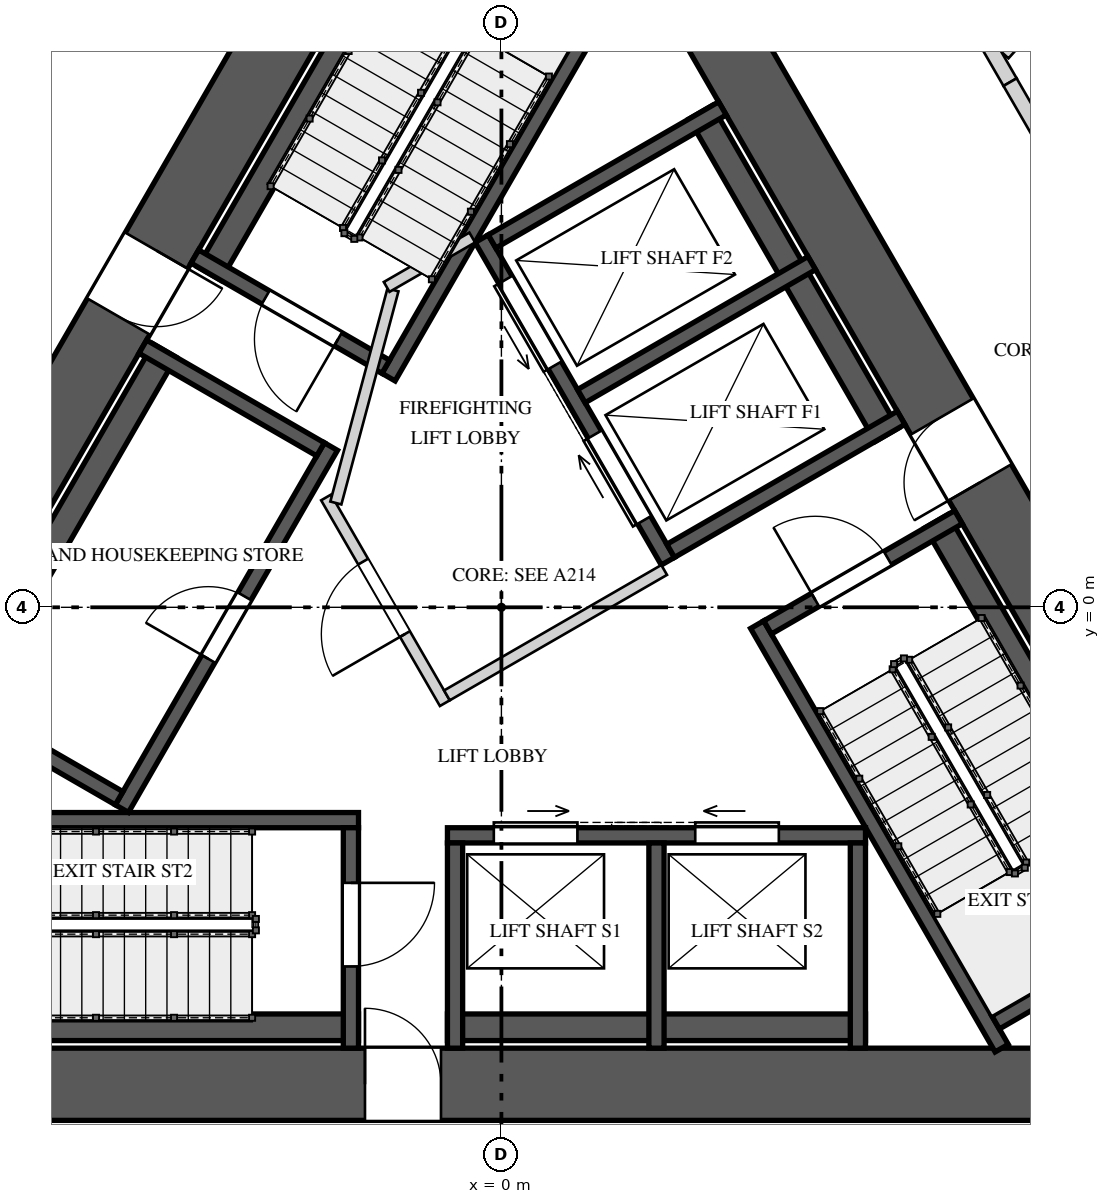
"""IFC4 building model, lengths in metres.
Left out: names, types, materials, properties, quantities, classifications, styles, units other than length and angle.
Written with IfcOpenShell. Run it as: python <this file> out.ifc"""

import sys

from ifc_helpers import new_model, si_unit, direction, frame, frame_2d, origin, place, context, subcontext, project, spatial, rectangle, extrude, element, fill, save


model = new_model("IFC4")
c1 = context("Model", 3, precision=1e-05, world=origin(), true_north=direction((0.0, 1.0)))
c2 = subcontext(c1, "Body", "Model", "MODEL_VIEW")
j1 = project(units=[si_unit("LENGTHUNIT", "METRE"), si_unit("PLANEANGLEUNIT", "RADIAN")], contexts=[c1])
p1 = place(None, origin())
s1 = spatial("IfcSite", under=j1, at=p1, CompositionType="ELEMENT")
p2 = place(p1, origin())
s2 = spatial("IfcBuilding", under=s1, at=p2, CompositionType="ELEMENT")
p3 = place(p2, frame((0.0, 0.0, 88.4)))
s3 = spatial("IfcBuildingStorey", under=s2, at=p3, CompositionType="ELEMENT", Elevation=88.4)
p4 = place(p3, frame((-1.169, 10.525, 0.0), z_axis=(0.0, 0.0, 1.0), x_axis=(-0.499999102847, -0.866025921755, 0.0)))
e1 = element("IfcWall", 1, at=p4, inside=s3, PredefinedType="SHEAR", context=c2, shape_type="SweptSolid", body=[
    extrude(rectangle(XDim=17.061, YDim=0.95, at=frame_2d((8.53, 0.0))), origin(), (0.0, 0.0, 1.0), 4.0),
])
p5 = place(p4, frame((6.735, 0.0, 0.0)))
e2 = element("IfcOpeningElement", 2, at=p5, cuts=e1, PredefinedType="OPENING", context=c2, shape_type="SweptSolid", body=[
    extrude(rectangle(XDim=1.0, YDim=2.4, at=frame_2d((0.5, 1.2))), frame((0.0, 0.485, 0.0), z_axis=(0.0, -1.0, 0.0), x_axis=(1.0, 0.0, 0.0)), (0.0, 0.0, 1.0), 0.97),
])
p6 = place(p4, frame((14.613, 0.0, 0.0)))
e3 = element("IfcOpeningElement", 3, at=p6, cuts=e1, PredefinedType="OPENING", context=c2, shape_type="SweptSolid", body=[
    extrude(rectangle(XDim=0.8, YDim=2.1, at=frame_2d((0.4, 1.05))), frame((0.0, 0.485, 0.0), z_axis=(0.0, -1.0, 0.0), x_axis=(1.0, 0.0, 0.0)), (0.0, 0.0, 1.0), 0.97),
])
p7 = place(p3, frame((-8.531, -6.275, 0.0), z_axis=(0.0, 0.0, 1.0), x_axis=(1.0, 0.0, 0.0)))
e4 = element("IfcWall", 4, at=p7, inside=s3, PredefinedType="SHEAR", context=c2, shape_type="SweptSolid", body=[
    extrude(rectangle(XDim=17.061, YDim=0.95, at=frame_2d((8.531, 0.0))), origin(), (0.0, 0.0, 1.0), 4.0),
])
p8 = place(p7, frame((6.735, 0.0, 0.0)))
e5 = element("IfcOpeningElement", 5, at=p8, cuts=e4, PredefinedType="OPENING", context=c2, shape_type="SweptSolid", body=[
    extrude(rectangle(XDim=1.0, YDim=2.4, at=frame_2d((0.5, 1.2))), frame((0.0, 0.485, 0.0), z_axis=(0.0, -1.0, 0.0), x_axis=(1.0, 0.0, 0.0)), (0.0, 0.0, 1.0), 0.97),
])
p9 = place(p3, frame((9.699, -4.25, 0.0), z_axis=(0.0, 0.0, 1.0), x_axis=(-0.499999102847, 0.866025921755, 0.0)))
e6 = element("IfcWall", 6, at=p9, inside=s3, PredefinedType="SHEAR", context=c2, shape_type="SweptSolid", body=[
    extrude(rectangle(XDim=17.061, YDim=0.95, at=frame_2d((8.53, 0.0))), origin(), (0.0, 0.0, 1.0), 4.0),
])
p10 = place(p9, frame((6.805, 0.0, 0.0)))
e7 = element("IfcOpeningElement", 7, at=p10, cuts=e6, PredefinedType="OPENING", context=c2, shape_type="SweptSolid", body=[
    extrude(rectangle(XDim=1.0, YDim=2.4, at=frame_2d((0.5, 1.2))), frame((0.0, 0.485, 0.0), z_axis=(0.0, -1.0, 0.0), x_axis=(1.0, 0.0, 0.0)), (0.0, 0.0, 1.0), 0.97),
])
p11 = place(p3, frame((-0.745, 9.76, 0.0), z_axis=(0.0, 0.0, 1.0), x_axis=(-0.49998037582, -0.866036733513, 0.0)))
e8 = element("IfcWall", 8, at=p11, inside=s3, PredefinedType="SOLIDWALL", context=c2, shape_type="SweptSolid", body=[
    extrude(rectangle(XDim=6.2, YDim=0.35, at=frame_2d((3.1, 0.0))), origin(), (0.0, 0.0, 1.0), 3.65),
])
p12 = place(p3, frame((1.732, 8.6, 0.0), z_axis=(0.0, 0.0, 1.0), x_axis=(-0.499975376872, -0.866039619487, 0.0)))
e9 = element("IfcWall", 9, at=p12, inside=s3, PredefinedType="SOLIDWALL", context=c2, shape_type="SweptSolid", body=[
    extrude(rectangle(XDim=6.434, YDim=0.2, at=frame_2d((3.217, 0.0))), origin(), (0.0, 0.0, 1.0), 3.65),
])
p13 = place(p3, frame((-1.521, 3.165, 0.0), z_axis=(0.0, 0.0, 1.0), x_axis=(-0.866032775405, 0.499987231761, 0.0)))
e10 = element("IfcWall", 10, at=p13, inside=s3, PredefinedType="SOLIDWALL", context=c2, shape_type="SweptSolid", body=[
    extrude(rectangle(XDim=2.9, YDim=0.2, at=frame_2d((1.45, 0.0))), origin(), (0.0, 0.0, 1.0), 3.65),
])
p14 = place(p13, frame((0.725, 0.0, 0.0)))
e11 = element("IfcOpeningElement", 11, at=p14, cuts=e10, PredefinedType="OPENING", context=c2, shape_type="SweptSolid", body=[
    extrude(rectangle(XDim=1.1, YDim=2.4, at=frame_2d((0.55, 1.2))), frame((0.0, 0.11, 0.0), z_axis=(0.0, -1.0, 0.0), x_axis=(1.0, 0.0, 0.0)), (0.0, 0.0, 1.0), 0.22),
])
p15 = place(p3, frame((-8.08, -5.525, 0.0), z_axis=(0.0, 0.0, 1.0), x_axis=(1.0, 0.0, 0.0)))
e12 = element("IfcWall", 12, at=p15, inside=s3, PredefinedType="SOLIDWALL", context=c2, shape_type="SweptSolid", body=[
    extrude(rectangle(XDim=6.2, YDim=0.35, at=frame_2d((3.1, 0.0))), origin(), (0.0, 0.0, 1.0), 3.65),
])
p16 = place(p3, frame((-8.314, -2.8, 0.0), z_axis=(0.0, 0.0, 1.0), x_axis=(1.0, 0.0, 0.0)))
e13 = element("IfcWall", 13, at=p16, inside=s3, PredefinedType="SOLIDWALL", context=c2, shape_type="SweptSolid", body=[
    extrude(rectangle(XDim=6.434, YDim=0.2, at=frame_2d((3.217, 0.0))), origin(), (0.0, 0.0, 1.0), 3.65),
])
p17 = place(p3, frame((-1.98, -2.9, 0.0), z_axis=(0.0, 0.0, 1.0), x_axis=(0.0, -1.0, 0.0)))
e14 = element("IfcWall", 14, at=p17, inside=s3, PredefinedType="SOLIDWALL", context=c2, shape_type="SweptSolid", body=[
    extrude(rectangle(XDim=2.9, YDim=0.2, at=frame_2d((1.45, 0.0))), origin(), (0.0, 0.0, 1.0), 3.65),
])
p18 = place(p17, frame((0.725, 0.0, 0.0)))
e15 = element("IfcOpeningElement", 15, at=p18, cuts=e14, PredefinedType="OPENING", context=c2, shape_type="SweptSolid", body=[
    extrude(rectangle(XDim=1.1, YDim=2.4, at=frame_2d((0.55, 1.2))), frame((0.0, 0.11, 0.0), z_axis=(0.0, -1.0, 0.0), x_axis=(1.0, 0.0, 0.0)), (0.0, 0.0, 1.0), 0.22),
])
p19 = place(p3, frame((8.825, -4.235, 0.0), z_axis=(0.0, 0.0, 1.0), x_axis=(-0.499997426962, 0.866026889324, 0.0)))
e16 = element("IfcWall", 16, at=p19, inside=s3, PredefinedType="SOLIDWALL", context=c2, shape_type="SweptSolid", body=[
    extrude(rectangle(XDim=6.2, YDim=0.35, at=frame_2d((3.1, 0.0))), origin(), (0.0, 0.0, 1.0), 3.65),
])
p20 = place(p3, frame((6.582, -5.8, 0.0), z_axis=(0.0, 0.0, 1.0), x_axis=(-0.499975376872, 0.866039619487, 0.0)))
e17 = element("IfcWall", 17, at=p20, inside=s3, PredefinedType="SOLIDWALL", context=c2, shape_type="SweptSolid", body=[
    extrude(rectangle(XDim=6.434, YDim=0.2, at=frame_2d((3.217, 0.0))), origin(), (0.0, 0.0, 1.0), 3.65),
])
p21 = place(p3, frame((6.501, -5.461, 0.0), z_axis=(0.0, 0.0, 1.0), x_axis=(0.866032775405, 0.499987231761, 0.0)))
e18 = element("IfcWall", 18, at=p21, inside=s3, PredefinedType="SOLIDWALL", context=c2, shape_type="SweptSolid", body=[
    extrude(rectangle(XDim=2.9, YDim=0.2, at=frame_2d((1.45, 0.0))), origin(), (0.0, 0.0, 1.0), 3.65),
])
p22 = place(p3, frame((3.501, -0.265, 0.0), z_axis=(0.0, 0.0, 1.0), x_axis=(0.866032775405, 0.499987231761, 0.0)))
e19 = element("IfcWall", 19, at=p22, inside=s3, PredefinedType="SOLIDWALL", context=c2, shape_type="SweptSolid", body=[
    extrude(rectangle(XDim=2.9, YDim=0.2, at=frame_2d((1.45, 0.0))), origin(), (0.0, 0.0, 1.0), 3.65),
])
p23 = place(p22, frame((0.725, 0.0, 0.0)))
e20 = element("IfcOpeningElement", 20, at=p23, cuts=e19, PredefinedType="OPENING", context=c2, shape_type="SweptSolid", body=[
    extrude(rectangle(XDim=1.1, YDim=2.4, at=frame_2d((0.55, 1.2))), frame((0.0, 0.11, 0.0), z_axis=(0.0, -1.0, 0.0), x_axis=(1.0, 0.0, 0.0)), (0.0, 0.0, 1.0), 0.22),
])
p24 = place(p3, frame((-4.993, -2.648, 0.0), z_axis=(0.0, 0.0, 1.0), x_axis=(0.499996545922, 0.866027397988, 0.0)))
e21 = element("IfcWall", 21, at=p24, inside=s3, PredefinedType="SOLIDWALL", context=c2, shape_type="SweptSolid", body=[
    extrude(rectangle(XDim=5.5, YDim=0.2, at=frame_2d((2.75, 0.0))), origin(), (0.0, 0.0, 1.0), 3.65),
])
p25 = place(p24, frame((2.275, 0.0, 0.0)))
e22 = element("IfcOpeningElement", 22, at=p25, cuts=e21, PredefinedType="OPENING", context=c2, shape_type="SweptSolid", body=[
    extrude(rectangle(XDim=0.95, YDim=2.4, at=frame_2d((0.475, 1.2))), frame((0.0, 0.11, 0.0), z_axis=(0.0, -1.0, 0.0), x_axis=(1.0, 0.0, 0.0)), (0.0, 0.0, 1.0), 0.22),
])
p26 = place(p3, frame((-4.43, 3.377, 0.0), z_axis=(0.0, 0.0, 1.0), x_axis=(-0.499996545922, -0.866027397988, 0.0)))
e23 = element("IfcWall", 23, at=p26, inside=s3, PredefinedType="SOLIDWALL", context=c2, shape_type="SweptSolid", body=[
    extrude(rectangle(XDim=5.5, YDim=0.35, at=frame_2d((2.75, 0.0))), origin(), (0.0, 0.0, 1.0), 3.65),
])
for number, where, z_axis, x_axis in (
    (24, (-2.38, 2.078, 0.0), (0.0, 0.0, 1.0), (-0.866, 0.5, 0.0)),
    (25, (-5.03, -2.512, 0.0), (0.0, 0.0, 1.0), (-0.866, 0.5, 0.0)),
):
    element("IfcWall", number, at=place(p3, frame(where, z_axis=z_axis, x_axis=x_axis)), inside=s3, PredefinedType="SOLIDWALL", context=c2, shape_type="SweptSolid", body=[
        extrude(rectangle(XDim=2.7, YDim=0.2, at=frame_2d((1.35, 0.0))), origin(), (0.0, 0.0, 1.0), 3.65),
    ])
p27 = place(p3, frame((-0.71, -3.0, 0.0), z_axis=(0.0, 0.0, 1.0), x_axis=(1.0, 0.0, 0.0)))
e26 = element("IfcWall", 26, at=p27, inside=s3, PredefinedType="SOLIDWALL", context=c2, shape_type="SweptSolid", body=[
    extrude(rectangle(XDim=5.5, YDim=0.2, at=frame_2d((2.75, 0.0))), origin(), (0.0, 0.0, 1.0), 3.65),
])
p28 = place(p27, frame((0.61, 0.0, 0.0)))
e27 = element("IfcOpeningElement", 27, at=p28, cuts=e26, PredefinedType="OPENING", context=c2, shape_type="SweptSolid", body=[
    extrude(rectangle(XDim=1.1, YDim=2.1, at=frame_2d((0.55, 1.05))), frame((0.0, 0.11, 0.0), z_axis=(0.0, -1.0, 0.0), x_axis=(1.0, 0.0, 0.0)), (0.0, 0.0, 1.0), 0.22),
])
p29 = place(p27, frame((3.26, 0.0, 0.0)))
e28 = element("IfcOpeningElement", 28, at=p29, cuts=e26, PredefinedType="OPENING", context=c2, shape_type="SweptSolid", body=[
    extrude(rectangle(XDim=1.1, YDim=2.1, at=frame_2d((0.55, 1.05))), frame((0.0, 0.11, 0.0), z_axis=(0.0, -1.0, 0.0), x_axis=(1.0, 0.0, 0.0)), (0.0, 0.0, 1.0), 0.22),
])
p30 = place(p3, frame((-0.71, -5.525, 0.0), z_axis=(0.0, 0.0, 1.0), x_axis=(1.0, 0.0, 0.0)))
e29 = element("IfcWall", 29, at=p30, inside=s3, PredefinedType="SOLIDWALL", context=c2, shape_type="SweptSolid", body=[
    extrude(rectangle(XDim=5.5, YDim=0.35, at=frame_2d((2.75, 0.0))), origin(), (0.0, 0.0, 1.0), 3.65),
])
for number, where, z_axis, x_axis in (
    (30, (-0.61, -3.1, 0.0), (0.0, 0.0, 1.0), (0.0, -1.0, 0.0)),
    (31, (2.04, -3.1, 0.0), (0.0, 0.0, 1.0), (0.0, -1.0, 0.0)),
    (32, (4.69, -3.1, 0.0), (0.0, 0.0, 1.0), (0.0, -1.0, 0.0)),
):
    element("IfcWall", number, at=place(p3, frame(where, z_axis=z_axis, x_axis=x_axis)), inside=s3, PredefinedType="SOLIDWALL", context=c2, shape_type="SweptSolid", body=[
        extrude(rectangle(XDim=2.7, YDim=0.2, at=frame_2d((1.35, 0.0))), origin(), (0.0, 0.0, 1.0), 3.65),
    ])
p31 = place(p3, frame((2.19, 0.606, 0.0), z_axis=(0.0, 0.0, 1.0), x_axis=(-0.500002801628, 0.866023786258, 0.0)))
e33 = element("IfcWall", 33, at=p31, inside=s3, PredefinedType="SOLIDWALL", context=c2, shape_type="SweptSolid", body=[
    extrude(rectangle(XDim=4.9, YDim=0.2, at=frame_2d((2.45, 0.0))), origin(), (0.0, 0.0, 1.0), 3.65),
])
p32 = place(p31, frame((0.625, 0.0, 0.0)))
e34 = element("IfcOpeningElement", 34, at=p32, cuts=e33, PredefinedType="OPENING", context=c2, shape_type="SweptSolid", body=[
    extrude(rectangle(XDim=1.3, YDim=2.1, at=frame_2d((0.65, 1.05))), frame((0.0, 0.11, 0.0), z_axis=(0.0, -1.0, 0.0), x_axis=(1.0, 0.0, 0.0)), (0.0, 0.0, 1.0), 0.22),
])
p33 = place(p31, frame((2.975, 0.0, 0.0)))
e35 = element("IfcOpeningElement", 35, at=p33, cuts=e33, PredefinedType="OPENING", context=c2, shape_type="SweptSolid", body=[
    extrude(rectangle(XDim=1.3, YDim=2.1, at=frame_2d((0.65, 1.05))), frame((0.0, 0.11, 0.0), z_axis=(0.0, -1.0, 0.0), x_axis=(1.0, 0.0, 0.0)), (0.0, 0.0, 1.0), 0.22),
])
p34 = place(p3, frame((5.07, 2.269, 0.0), z_axis=(0.0, 0.0, 1.0), x_axis=(-0.49998122708, 0.866036242063, 0.0)))
e36 = element("IfcWall", 36, at=p34, inside=s3, PredefinedType="SOLIDWALL", context=c2, shape_type="SweptSolid", body=[
    extrude(rectangle(XDim=4.9, YDim=0.35, at=frame_2d((2.45, 0.0))), origin(), (0.0, 0.0, 1.0), 3.65),
])
for number, where, z_axis, x_axis in (
    (37, (2.227, 0.743, 0.0), (0.0, 0.0, 1.0), (0.866, 0.5, 0.0)),
    (38, (1.052, 2.778, 0.0), (0.0, 0.0, 1.0), (0.866, 0.5, 0.0)),
):
    element("IfcWall", number, at=place(p3, frame(where, z_axis=z_axis, x_axis=x_axis)), inside=s3, PredefinedType="SOLIDWALL", context=c2, shape_type="SweptSolid", body=[
        extrude(rectangle(XDim=3.5, YDim=0.2, at=frame_2d((1.75, 0.0))), origin(), (0.0, 0.0, 1.0), 3.65),
    ])
p35 = place(p3, frame((-0.123, 4.813, 0.0), z_axis=(0.0, 0.0, 1.0), x_axis=(0.866019471182, 0.500010275428, 0.0)))
e39 = element("IfcWall", 39, at=p35, inside=s3, PredefinedType="SOLIDWALL", context=c2, shape_type="SweptSolid", body=[
    extrude(rectangle(XDim=3.5, YDim=0.2, at=frame_2d((1.75, 0.0))), origin(), (0.0, 0.0, 1.0), 3.65),
])
p36 = place(p3, frame((-0.744, -1.261, 0.0), z_axis=(0.0, 0.0, 1.0), x_axis=(-0.500004234368, 0.866022959057, 0.0)))
e40 = element("IfcWall", 40, at=p36, inside=s3, PredefinedType="PARTITIONING", context=c2, shape_type="SweptSolid", body=[
    extrude(rectangle(XDim=3.125, YDim=0.15, at=frame_2d((1.562, 0.0))), origin(), (0.0, 0.0, 1.0), 3.65),
])
p37 = place(p36, frame((1.05, 0.0, 0.0)))
e41 = element("IfcOpeningElement", 41, at=p37, cuts=e40, PredefinedType="OPENING", context=c2, shape_type="SweptSolid", body=[
    extrude(rectangle(XDim=1.1, YDim=2.4, at=frame_2d((0.55, 1.2))), frame((0.0, 0.085, 0.0), z_axis=(0.0, -1.0, 0.0), x_axis=(1.0, 0.0, 0.0)), (0.0, 0.0, 1.0), 0.17),
])
p38 = place(p3, frame((-0.717, -1.159, 0.0), z_axis=(0.0, 0.0, 1.0), x_axis=(0.866008176907, 0.50002983664, 0.0)))
e42 = element("IfcWall", 42, at=p38, inside=s3, PredefinedType="PARTITIONING", context=c2, shape_type="SweptSolid", body=[
    extrude(rectangle(XDim=3.3, YDim=0.15, at=frame_2d((1.65, 0.0))), origin(), (0.0, 0.0, 1.0), 3.65),
])
p39 = place(p3, frame((-2.178, 1.372, 0.0), z_axis=(0.0, 0.0, 1.0), x_axis=(0.258808958833, 0.96592852884, 0.0)))
e43 = element("IfcWall", 43, at=p39, inside=s3, PredefinedType="PARTITIONING", context=c2, shape_type="SweptSolid", body=[
    extrude(rectangle(XDim=2.903, YDim=0.15, at=frame_2d((1.451, 0.0))), origin(), (0.0, 0.0, 1.0), 3.65),
])
p40 = place(p3, frame((-1.51, 4.215, 0.0), z_axis=(0.0, 0.0, 1.0), x_axis=(0.866085525409, 0.49989585183, 0.0)))
e44 = element("IfcWall", 44, at=p40, inside=s3, PredefinedType="PARTITIONING", context=c2, shape_type="SweptSolid", body=[
    extrude(rectangle(XDim=1.3, YDim=0.15, at=frame_2d((0.65, 0.0))), origin(), (0.0, 0.0, 1.0), 3.65),
])
p41 = place(p3, frame((11.442, 12.708, 0.0), z_axis=(0.0, 0.0, 1.0), x_axis=(-0.66912430182, -0.743150502061, 0.0)))
e45 = element("IfcWall", 45, at=p41, inside=s3, PredefinedType="SOLIDWALL", context=c2, shape_type="SweptSolid", body=[
    extrude(rectangle(XDim=7.269, YDim=0.25, at=frame_2d((3.634, 0.0))), origin(), (0.0, 0.0, 1.0), 2.95),
])
p42 = place(p3, frame((6.324, 7.547, 0.0), z_axis=(0.0, 0.0, 1.0), x_axis=(0.499885169746, -0.866091690913, 0.0)))
e46 = element("IfcWall", 46, at=p42, inside=s3, PredefinedType="SOLIDWALL", context=c2, shape_type="SweptSolid", body=[
    extrude(rectangle(XDim=0.736, YDim=0.2, at=frame_2d((0.368, 0.0))), origin(), (0.0, 0.0, 1.0), 2.95),
])
p43 = place(p3, frame((6.692, 6.909, 0.0), z_axis=(0.0, 0.0, 1.0), x_axis=(0.500029679218, -0.866008267802, 0.0)))
e47 = element("IfcWall", 47, at=p43, inside=s3, PredefinedType="SOLIDWALL", context=c2, shape_type="SweptSolid", body=[
    extrude(rectangle(XDim=3.577, YDim=0.2, at=frame_2d((1.789, 0.0))), origin(), (0.0, 0.0, 1.0), 3.65),
])
p44 = place(p3, frame((-7.137, 6.139, 0.0), z_axis=(0.0, 0.0, 1.0), x_axis=(0.500035462246, 0.866004928679, 0.0)))
e48 = element("IfcWall", 48, at=p44, inside=s3, PredefinedType="SOLIDWALL", context=c2, shape_type="SweptSolid", body=[
    extrude(rectangle(XDim=2.385, YDim=0.2, at=frame_2d((1.193, 0.0))), origin(), (0.0, 0.0, 1.0), 3.65),
])
p45 = place(p14, origin())
e49 = element("IfcDoor", 49, at=p45, inside=s3, OperationType="SINGLE_SWING_RIGHT", PredefinedType="DOOR", context=c2, shape_type="SweptSolid", body=[
    extrude(rectangle(XDim=1.1, YDim=2.4, at=frame_2d((0.55, 1.2))), frame((0.0, 0.025, 0.0), z_axis=(0.0, -1.0, 0.0), x_axis=(1.0, 0.0, 0.0)), (0.0, 0.0, 1.0), 0.05),
])
fill(e11, e49)
p46 = place(p18, origin())
e50 = element("IfcDoor", 50, at=p46, inside=s3, OperationType="SINGLE_SWING_LEFT", PredefinedType="DOOR", context=c2, shape_type="SweptSolid", body=[
    extrude(rectangle(XDim=1.1, YDim=2.4, at=frame_2d((0.55, 1.2))), frame((0.0, 0.025, 0.0), z_axis=(0.0, -1.0, 0.0), x_axis=(1.0, 0.0, 0.0)), (0.0, 0.0, 1.0), 0.05),
])
fill(e15, e50)
p47 = place(p23, origin())
e51 = element("IfcDoor", 51, at=p47, inside=s3, OperationType="SINGLE_SWING_RIGHT", PredefinedType="DOOR", context=c2, shape_type="SweptSolid", body=[
    extrude(rectangle(XDim=1.1, YDim=2.4, at=frame_2d((0.55, 1.2))), frame((0.0, 0.025, 0.0), z_axis=(0.0, -1.0, 0.0), x_axis=(1.0, 0.0, 0.0)), (0.0, 0.0, 1.0), 0.05),
])
fill(e20, e51)
p48 = place(p25, origin())
e52 = element("IfcDoor", 52, at=p48, inside=s3, OperationType="SINGLE_SWING_LEFT", PredefinedType="DOOR", context=c2, shape_type="SweptSolid", body=[
    extrude(rectangle(XDim=0.95, YDim=2.4, at=frame_2d((0.475, 1.2))), frame((0.0, 0.025, 0.0), z_axis=(0.0, -1.0, 0.0), x_axis=(1.0, 0.0, 0.0)), (0.0, 0.0, 1.0), 0.05),
])
fill(e22, e52)
p49 = place(p28, origin())
e53 = element("IfcDoor", 53, at=p49, inside=s3, OperationType="SLIDING_TO_RIGHT", PredefinedType="DOOR", context=c2, shape_type="SweptSolid", body=[
    extrude(rectangle(XDim=1.1, YDim=2.1, at=frame_2d((0.55, 1.05))), frame((0.0, 0.025, 0.0), z_axis=(0.0, -1.0, 0.0), x_axis=(1.0, 0.0, 0.0)), (0.0, 0.0, 1.0), 0.05),
])
fill(e27, e53)
p50 = place(p29, origin())
e54 = element("IfcDoor", 54, at=p50, inside=s3, OperationType="SLIDING_TO_LEFT", PredefinedType="DOOR", context=c2, shape_type="SweptSolid", body=[
    extrude(rectangle(XDim=1.1, YDim=2.1, at=frame_2d((0.55, 1.05))), frame((0.0, 0.025, 0.0), z_axis=(0.0, -1.0, 0.0), x_axis=(1.0, 0.0, 0.0)), (0.0, 0.0, 1.0), 0.05),
])
fill(e28, e54)
p51 = place(p32, origin())
e55 = element("IfcDoor", 55, at=p51, inside=s3, OperationType="SLIDING_TO_RIGHT", PredefinedType="DOOR", context=c2, shape_type="SweptSolid", body=[
    extrude(rectangle(XDim=1.3, YDim=2.1, at=frame_2d((0.65, 1.05))), frame((0.0, 0.025, 0.0), z_axis=(0.0, -1.0, 0.0), x_axis=(1.0, 0.0, 0.0)), (0.0, 0.0, 1.0), 0.05),
])
fill(e34, e55)
p52 = place(p33, origin())
e56 = element("IfcDoor", 56, at=p52, inside=s3, OperationType="SLIDING_TO_LEFT", PredefinedType="DOOR", context=c2, shape_type="SweptSolid", body=[
    extrude(rectangle(XDim=1.3, YDim=2.1, at=frame_2d((0.65, 1.05))), frame((0.0, 0.025, 0.0), z_axis=(0.0, -1.0, 0.0), x_axis=(1.0, 0.0, 0.0)), (0.0, 0.0, 1.0), 0.05),
])
fill(e35, e56)
p53 = place(p37, origin())
e57 = element("IfcDoor", 57, at=p53, inside=s3, OperationType="SINGLE_SWING_RIGHT", PredefinedType="DOOR", context=c2, shape_type="SweptSolid", body=[
    extrude(rectangle(XDim=1.1, YDim=2.4, at=frame_2d((0.55, 1.2))), frame((0.0, 0.025, 0.0), z_axis=(0.0, -1.0, 0.0), x_axis=(1.0, 0.0, 0.0)), (0.0, 0.0, 1.0), 0.05),
])
fill(e41, e57)
p54 = place(p5, origin())
e58 = element("IfcDoor", 58, at=p54, inside=s3, OperationType="SINGLE_SWING_LEFT", PredefinedType="DOOR", context=c2, shape_type="SweptSolid", body=[
    extrude(rectangle(XDim=1.0, YDim=2.4, at=frame_2d((0.5, 1.2))), frame((0.0, 0.025, 0.0), z_axis=(0.0, -1.0, 0.0), x_axis=(1.0, 0.0, 0.0)), (0.0, 0.0, 1.0), 0.05),
])
fill(e2, e58)
p55 = place(p8, origin())
e59 = element("IfcDoor", 59, at=p55, inside=s3, OperationType="SINGLE_SWING_RIGHT", PredefinedType="DOOR", context=c2, shape_type="SweptSolid", body=[
    extrude(rectangle(XDim=1.0, YDim=2.4, at=frame_2d((0.5, 1.2))), frame((0.0, 0.025, 0.0), z_axis=(0.0, -1.0, 0.0), x_axis=(1.0, 0.0, 0.0)), (0.0, 0.0, 1.0), 0.05),
])
fill(e5, e59)
p56 = place(p10, origin())
e60 = element("IfcDoor", 60, at=p56, inside=s3, OperationType="SINGLE_SWING_LEFT", PredefinedType="DOOR", context=c2, shape_type="SweptSolid", body=[
    extrude(rectangle(XDim=1.0, YDim=2.4, at=frame_2d((0.5, 1.2))), frame((0.0, 0.025, 0.0), z_axis=(0.0, -1.0, 0.0), x_axis=(1.0, 0.0, 0.0)), (0.0, 0.0, 1.0), 0.05),
])
fill(e7, e60)
save(model, sys.argv[1])
